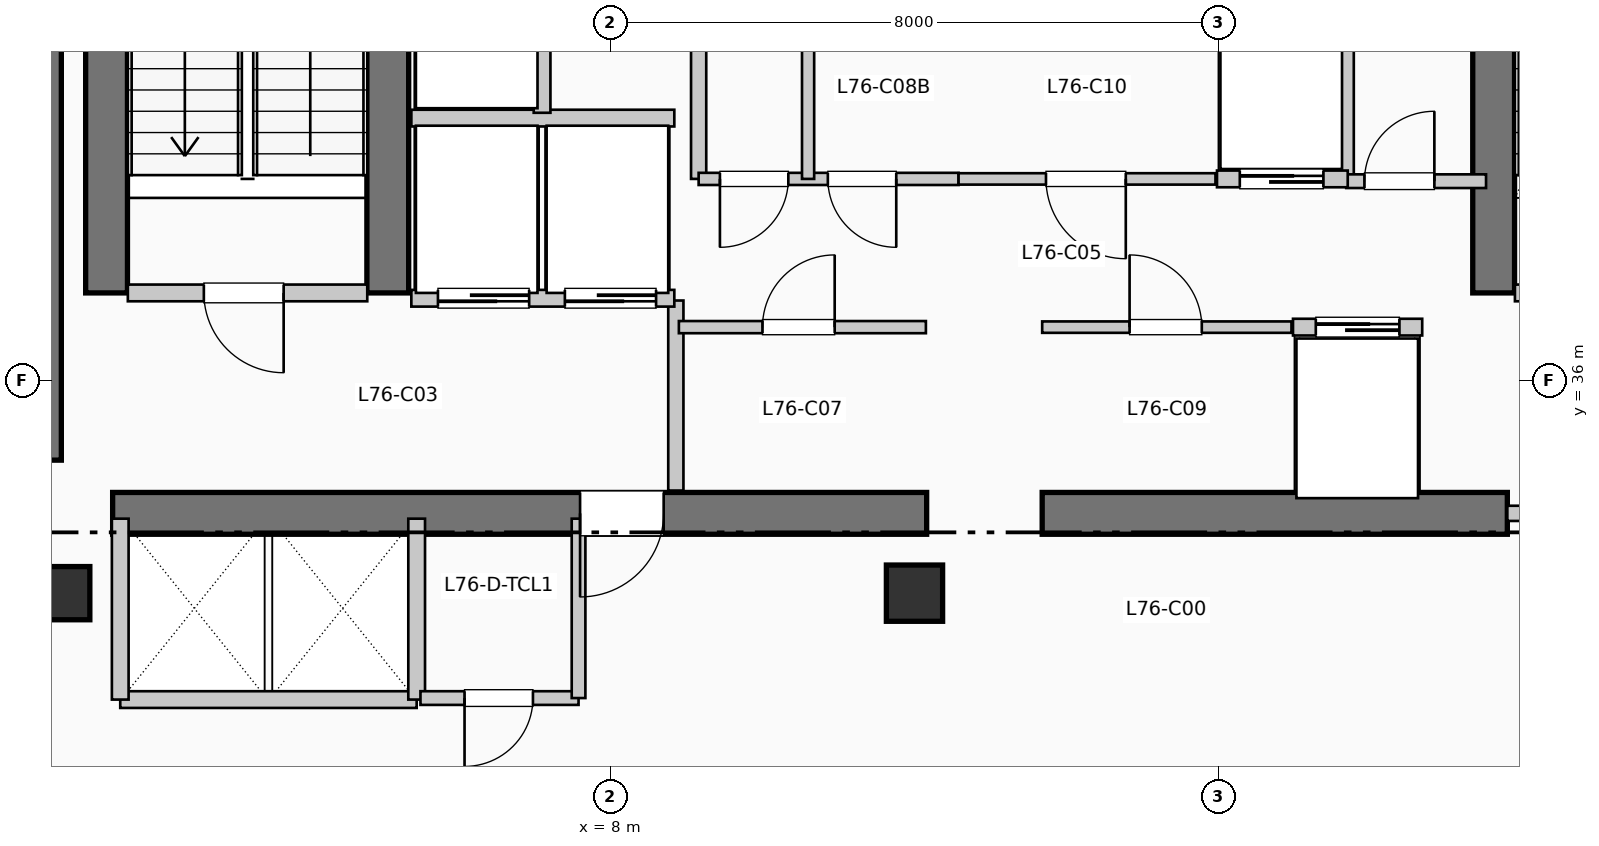
"""IFC4 building model, lengths in metres.
Left out: names, types, materials, properties, quantities, classifications, styles, units other than length and angle.
Written with IfcOpenShell. Run it as: python <this file> out.ifc"""

import sys

from ifc_helpers import new_model, si_unit, direction, frame, frame_2d, origin, origin_2d, place, context, subcontext, project, spatial, rectangle, extrude, element, fill, save


model = new_model("IFC4")
c1 = context("Model", 3, precision=1e-05, world=origin(), true_north=direction((0.0, 1.0)))
c2 = subcontext(c1, "Body", "Model", "MODEL_VIEW")
j1 = project(units=[si_unit("LENGTHUNIT", "METRE"), si_unit("PLANEANGLEUNIT", "RADIAN")], contexts=[c1])
p1 = place(None, origin())
s1 = spatial("IfcSite", under=j1, at=p1, CompositionType="ELEMENT")
p2 = place(p1, origin())
s2 = spatial("IfcBuilding", under=s1, at=p2, CompositionType="ELEMENT")
p3 = place(p2, frame((0.0, 0.0, 311.85)))
s3 = spatial("IfcBuildingStorey", under=s2, at=p3, CompositionType="ELEMENT", Elevation=311.85)
p4 = place(p3, frame((0.5, 34.95, 0.0), z_axis=(0.0, 0.0, 1.0), x_axis=(0.0, 1.0, 0.0)))
e1 = element("IfcWall", 1, at=p4, inside=s3, PredefinedType="SHEAR", context=c2, shape_type="SweptSolid", body=[
    extrude(rectangle(XDim=7.9, YDim=0.55, at=frame_2d((3.95, 0.0))), origin(), (0.0, 0.0, 1.0), 3.96),
])
p5 = place(p3, frame((1.45, 34.25, 0.0), z_axis=(0.0, 0.0, 1.0), x_axis=(1.0, 0.0, 0.0)))
e2 = element("IfcWall", 2, at=p5, inside=s3, PredefinedType="SHEAR", context=c2, shape_type="SweptSolid", body=[
    extrude(rectangle(XDim=10.71, YDim=0.55, at=frame_2d((5.355, 0.0))), origin(), (0.0, 0.0, 1.0), 3.96),
])
p6 = place(p5, frame((7.25, 0.0, 0.0), z_axis=(0.0, 0.0, 1.0), x_axis=(-1.0, 0.0, 0.0)))
e3 = element("IfcOpeningElement", 3, at=p6, cuts=e2, PredefinedType="OPENING", context=c2, shape_type="SweptSolid", body=[
    extrude(rectangle(XDim=1.1, YDim=2.15, at=frame_2d((0.55, 1.075))), frame((0.0, 0.285, 0.0), z_axis=(0.0, -1.0, 0.0), x_axis=(1.0, 0.0, 0.0)), (0.0, 0.0, 1.0), 0.57),
])
p7 = place(p3, frame((13.68, 34.25, 0.0), z_axis=(0.0, 0.0, 1.0), x_axis=(1.0, 0.0, 0.0)))
e4 = element("IfcWall", 4, at=p7, inside=s3, PredefinedType="SHEAR", context=c2, shape_type="SweptSolid", body=[
    extrude(rectangle(XDim=6.12, YDim=0.55, at=frame_2d((3.06, 0.0))), origin(), (0.0, 0.0, 1.0), 3.96),
])
for number, where, z_axis, x_axis in (
    (5, (1.37, 37.15, 0.0), (0.0, 0.0, 1.0), (0.0, 1.0, 0.0)),
    (6, (5.07, 37.15, 0.0), (0.0, 0.0, 1.0), (0.0, 1.0, 0.0)),
    (7, (19.62, 37.15, 0.0), (0.0, 0.0, 1.0), (0.0, 1.0, 0.0)),
):
    element("IfcWall", number, at=place(p3, frame(where, z_axis=z_axis, x_axis=x_axis)), inside=s3, PredefinedType="SHEAR", context=c2, shape_type="SweptSolid", body=[
        extrude(rectangle(XDim=7.89, YDim=0.55, at=frame_2d((3.945, 0.0))), origin(), (0.0, 0.0, 1.0), 3.96),
    ])
p8 = place(p3, frame((0.8, 33.2, 0.0), z_axis=(0.0, 0.0, 1.0), x_axis=(1.0, 0.0, 0.0)))
e8 = element("IfcColumn", 8, at=p8, inside=s3, PredefinedType="COLUMN", context=c2, shape_type="SweptSolid", body=[
    extrude(rectangle(XDim=0.7, YDim=0.7, at=origin_2d()), origin(), (0.0, 0.0, 1.0), 3.96),
])
p9 = place(p3, frame((12.0, 33.2, 0.0), z_axis=(0.0, 0.0, 1.0), x_axis=(1.0, 0.0, 0.0)))
e9 = element("IfcColumn", 9, at=p9, inside=s3, PredefinedType="COLUMN", context=c2, shape_type="SweptSolid", body=[
    extrude(rectangle(XDim=0.74, YDim=0.74, at=origin_2d()), origin(), (0.0, 0.0, 1.0), 3.96),
])
p10 = place(p3, frame((1.65, 37.15, 0.0), z_axis=(0.0, 0.0, 1.0), x_axis=(1.0, 0.0, 0.0)))
e10 = element("IfcWall", 10, at=p10, inside=s3, PredefinedType="PARTITIONING", context=c2, shape_type="SweptSolid", body=[
    extrude(rectangle(XDim=3.15, YDim=0.22, at=frame_2d((1.575, 0.0))), origin(), (0.0, 0.0, 1.0), 3.74),
])
p11 = place(p10, frame((2.05, 0.0, 0.0), z_axis=(0.0, 0.0, 1.0), x_axis=(-1.0, 0.0, 0.0)))
e11 = element("IfcOpeningElement", 11, at=p11, cuts=e10, PredefinedType="OPENING", context=c2, shape_type="SweptSolid", body=[
    extrude(rectangle(XDim=1.05, YDim=2.15, at=frame_2d((0.525, 1.075))), frame((0.0, 0.12, 0.0), z_axis=(0.0, -1.0, 0.0), x_axis=(1.0, 0.0, 0.0)), (0.0, 0.0, 1.0), 0.24),
])
p12 = place(p3, frame((8.86, 34.55, 0.0), z_axis=(0.0, 0.0, 1.0), x_axis=(0.0, 1.0, 0.0)))
e12 = element("IfcWall", 12, at=p12, inside=s3, PredefinedType="PARTITIONING", context=c2, shape_type="SweptSolid", body=[
    extrude(rectangle(XDim=2.5, YDim=0.2, at=frame_2d((1.25, 0.0))), origin(), (0.0, 0.0, 1.0), 3.74),
])
p13 = place(p3, frame((19.9, 37.15, 0.0), z_axis=(0.0, 0.0, 1.0), x_axis=(1.0, 0.0, 0.0)))
e13 = element("IfcWall", 13, at=p13, inside=s3, PredefinedType="PARTITIONING", context=c2, shape_type="SweptSolid", body=[
    extrude(rectangle(XDim=3.15, YDim=0.22, at=frame_2d((1.575, 0.0))), origin(), (0.0, 0.0, 1.0), 3.74),
])
p14 = place(p13, frame((2.05, 0.0, 0.0), z_axis=(0.0, 0.0, 1.0), x_axis=(-1.0, 0.0, 0.0)))
e14 = element("IfcOpeningElement", 14, at=p14, cuts=e13, PredefinedType="OPENING", context=c2, shape_type="SweptSolid", body=[
    extrude(rectangle(XDim=1.05, YDim=2.15, at=frame_2d((0.525, 1.075))), frame((0.0, 0.12, 0.0), z_axis=(0.0, -1.0, 0.0), x_axis=(1.0, 0.0, 0.0)), (0.0, 0.0, 1.0), 0.24),
])
p15 = place(p3, frame((19.8, 34.25, 0.0), z_axis=(0.0, 0.0, 1.0), x_axis=(1.0, 0.0, 0.0)))
e15 = element("IfcWall", 15, at=p15, inside=s3, PredefinedType="PARTITIONING", context=c2, shape_type="SweptSolid", body=[
    extrude(rectangle(XDim=3.25, YDim=0.2, at=frame_2d((1.625, 0.0))), origin(), (0.0, 0.0, 1.0), 3.74),
])
p16 = place(p15, frame((2.15, 0.0, 0.0), z_axis=(0.0, 0.0, 1.0), x_axis=(-1.0, 0.0, 0.0)))
e16 = element("IfcOpeningElement", 16, at=p16, cuts=e15, PredefinedType="OPENING", context=c2, shape_type="SweptSolid", body=[
    extrude(rectangle(XDim=1.1, YDim=2.15, at=frame_2d((0.55, 1.075))), frame((0.0, 0.11, 0.0), z_axis=(0.0, -1.0, 0.0), x_axis=(1.0, 0.0, 0.0)), (0.0, 0.0, 1.0), 0.22),
])
p17 = place(p3, frame((5.38, 37.08, 0.0), z_axis=(0.0, 0.0, 1.0), x_axis=(1.0, 0.0, 0.0)))
e17 = element("IfcWall", 17, at=p17, inside=s3, PredefinedType="PARTITIONING", context=c2, shape_type="SweptSolid", body=[
    extrude(rectangle(XDim=3.46, YDim=0.22, at=frame_2d((1.73, 0.0))), origin(), (0.0, 0.0, 1.0), 3.74),
])
p18 = place(p17, frame((1.55, 0.0, 0.0), z_axis=(0.0, 0.0, 1.0), x_axis=(-1.0, 0.0, 0.0)))
e18 = element("IfcOpeningElement", 18, at=p18, cuts=e17, PredefinedType="OPENING", context=c2, shape_type="SweptSolid", body=[
    extrude(rectangle(XDim=1.2, YDim=2.2, at=frame_2d((0.6, 1.1))), frame((0.0, 0.12, 0.0), z_axis=(0.0, -1.0, 0.0), x_axis=(1.0, 0.0, 0.0)), (0.0, 0.0, 1.0), 0.24),
])
p19 = place(p17, frame((3.22, 0.0, 0.0), z_axis=(0.0, 0.0, 1.0), x_axis=(-1.0, 0.0, 0.0)))
e19 = element("IfcOpeningElement", 19, at=p19, cuts=e17, PredefinedType="OPENING", context=c2, shape_type="SweptSolid", body=[
    extrude(rectangle(XDim=1.2, YDim=2.2, at=frame_2d((0.6, 1.1))), frame((0.0, 0.12, 0.0), z_axis=(0.0, -1.0, 0.0), x_axis=(1.0, 0.0, 0.0)), (0.0, 0.0, 1.0), 0.24),
])
p20 = place(p3, frame((5.38, 39.45, 0.0), z_axis=(0.0, 0.0, 1.0), x_axis=(1.0, 0.0, 0.0)))
e20 = element("IfcWall", 20, at=p20, inside=s3, PredefinedType="PARTITIONING", context=c2, shape_type="SweptSolid", body=[
    extrude(rectangle(XDim=3.46, YDim=0.22, at=frame_2d((1.73, 0.0))), origin(), (0.0, 0.0, 1.0), 3.74),
])
p21 = place(p3, frame((7.1, 39.52, 0.0), z_axis=(0.0, 0.0, 1.0), x_axis=(0.0, 1.0, 0.0)))
e21 = element("IfcWall", 21, at=p21, inside=s3, PredefinedType="PARTITIONING", context=c2, shape_type="SweptSolid", body=[
    extrude(rectangle(XDim=2.93, YDim=0.22, at=frame_2d((1.465, 0.0))), origin(), (0.0, 0.0, 1.0), 3.74),
])
p22 = place(p21, frame((0.85, 0.0, 0.0)))
e22 = element("IfcOpeningElement", 22, at=p22, cuts=e21, PredefinedType="OPENING", context=c2, shape_type="SweptSolid", body=[
    extrude(rectangle(XDim=1.1, YDim=2.2, at=frame_2d((0.55, 1.1))), frame((0.0, 0.12, 0.0), z_axis=(0.0, -1.0, 0.0), x_axis=(1.0, 0.0, 0.0)), (0.0, 0.0, 1.0), 0.24),
])
p23 = place(p3, frame((1.55, 31.8, 0.0), z_axis=(0.0, 0.0, 1.0), x_axis=(1.0, 0.0, 0.0)))
e23 = element("IfcWall", 23, at=p23, inside=s3, PredefinedType="PARTITIONING", context=c2, shape_type="SweptSolid", body=[
    extrude(rectangle(XDim=3.9, YDim=0.22, at=frame_2d((1.95, 0.0))), origin(), (0.0, 0.0, 1.0), 3.74),
])
for number, where, z_axis, x_axis in (
    (24, (1.55, 31.8, 0.0), (0.0, 0.0, 1.0), (0.0, 1.0, 0.0)),
    (25, (5.45, 31.8, 0.0), (0.0, 0.0, 1.0), (0.0, 1.0, 0.0)),
):
    element("IfcWall", number, at=place(p3, frame(where, z_axis=z_axis, x_axis=x_axis)), inside=s3, PredefinedType="PARTITIONING", context=c2, shape_type="SweptSolid", body=[
        extrude(rectangle(XDim=2.38, YDim=0.22, at=frame_2d((1.19, 0.0))), origin(), (0.0, 0.0, 1.0), 3.74),
    ])
for number, where, z_axis, x_axis in (
    (26, (9.16, 38.65, 0.0), (0.0, 0.0, 1.0), (0.0, 1.0, 0.0)),
    (27, (17.68, 38.65, 0.0), (0.0, 0.0, 1.0), (0.0, 1.0, 0.0)),
):
    element("IfcWall", number, at=place(p3, frame(where, z_axis=z_axis, x_axis=x_axis)), inside=s3, PredefinedType="PARTITIONING", context=c2, shape_type="SweptSolid", body=[
        extrude(rectangle(XDim=2.35, YDim=0.2, at=frame_2d((1.175, 0.0))), origin(), (0.0, 0.0, 1.0), 3.74),
    ])
p24 = place(p3, frame((17.68, 38.62, 0.0), z_axis=(0.0, 0.0, 1.0), x_axis=(1.0, 0.0, 0.0)))
e28 = element("IfcWall", 28, at=p24, inside=s3, PredefinedType="PARTITIONING", context=c2, shape_type="SweptSolid", body=[
    extrude(rectangle(XDim=1.84, YDim=0.18, at=frame_2d((0.92, 0.0))), origin(), (0.0, 0.0, 1.0), 3.74),
])
p25 = place(p24, frame((0.24, 0.0, 0.0)))
e29 = element("IfcOpeningElement", 29, at=p25, cuts=e28, PredefinedType="OPENING", context=c2, shape_type="SweptSolid", body=[
    extrude(rectangle(XDim=0.92, YDim=2.1, at=frame_2d((0.46, 1.05))), frame((0.0, 0.1, 0.0), z_axis=(0.0, -1.0, 0.0), x_axis=(1.0, 0.0, 0.0)), (0.0, 0.0, 1.0), 0.2),
])
p26 = place(p3, frame((5.5, 31.82, 0.0), z_axis=(0.0, 0.0, 1.0), x_axis=(1.0, 0.0, 0.0)))
e30 = element("IfcWall", 30, at=p26, inside=s3, PredefinedType="PLUMBINGWALL", context=c2, shape_type="SweptSolid", body=[
    extrude(rectangle(XDim=2.08, YDim=0.18, at=frame_2d((1.04, 0.0))), origin(), (0.0, 0.0, 1.0), 3.74),
])
p27 = place(p26, frame((1.48, 0.0, 0.0), z_axis=(0.0, 0.0, 1.0), x_axis=(-1.0, 0.0, 0.0)))
e31 = element("IfcOpeningElement", 31, at=p27, cuts=e30, PredefinedType="OPENING", context=c2, shape_type="SweptSolid", body=[
    extrude(rectangle(XDim=0.9, YDim=2.1, at=frame_2d((0.45, 1.05))), frame((0.0, 0.1, 0.0), z_axis=(0.0, -1.0, 0.0), x_axis=(1.0, 0.0, 0.0)), (0.0, 0.0, 1.0), 0.2),
])
p28 = place(p3, frame((7.58, 31.82, 0.0), z_axis=(0.0, 0.0, 1.0), x_axis=(0.0, 1.0, 0.0)))
e32 = element("IfcWall", 32, at=p28, inside=s3, PredefinedType="PLUMBINGWALL", context=c2, shape_type="SweptSolid", body=[
    extrude(rectangle(XDim=2.36, YDim=0.18, at=frame_2d((1.18, 0.0))), origin(), (0.0, 0.0, 1.0), 3.74),
])
p29 = place(p3, frame((8.9, 36.7, 0.0), z_axis=(0.0, 0.0, 1.0), x_axis=(1.0, 0.0, 0.0)))
e33 = element("IfcWall", 33, at=p29, inside=s3, PredefinedType="PARTITIONING", context=c2, shape_type="SweptSolid", body=[
    extrude(rectangle(XDim=3.25, YDim=0.16, at=frame_2d((1.625, 0.0))), origin(), (0.0, 0.0, 1.0), 3.74),
])
p30 = place(p29, frame((1.1, 0.0, 0.0)))
e34 = element("IfcOpeningElement", 34, at=p30, cuts=e33, PredefinedType="OPENING", context=c2, shape_type="SweptSolid", body=[
    extrude(rectangle(XDim=0.95, YDim=2.15, at=frame_2d((0.475, 1.075))), frame((0.0, 0.09, 0.0), z_axis=(0.0, -1.0, 0.0), x_axis=(1.0, 0.0, 0.0)), (0.0, 0.0, 1.0), 0.18),
])
p31 = place(p3, frame((9.16, 38.65, 0.0), z_axis=(0.0, 0.0, 1.0), x_axis=(1.0, 0.0, 0.0)))
e35 = element("IfcWall", 35, at=p31, inside=s3, PredefinedType="PARTITIONING", context=c2, shape_type="SweptSolid", body=[
    extrude(rectangle(XDim=3.42, YDim=0.16, at=frame_2d((1.71, 0.0))), origin(), (0.0, 0.0, 1.0), 3.74),
])
p32 = place(p31, frame((1.18, 0.0, 0.0), z_axis=(0.0, 0.0, 1.0), x_axis=(-1.0, 0.0, 0.0)))
e36 = element("IfcOpeningElement", 36, at=p32, cuts=e35, PredefinedType="OPENING", context=c2, shape_type="SweptSolid", body=[
    extrude(rectangle(XDim=0.9, YDim=2.15, at=frame_2d((0.45, 1.075))), frame((0.0, 0.09, 0.0), z_axis=(0.0, -1.0, 0.0), x_axis=(1.0, 0.0, 0.0)), (0.0, 0.0, 1.0), 0.18),
])
p33 = place(p31, frame((2.6, 0.0, 0.0), z_axis=(0.0, 0.0, 1.0), x_axis=(-1.0, 0.0, 0.0)))
e37 = element("IfcOpeningElement", 37, at=p33, cuts=e35, PredefinedType="OPENING", context=c2, shape_type="SweptSolid", body=[
    extrude(rectangle(XDim=0.9, YDim=2.15, at=frame_2d((0.45, 1.075))), frame((0.0, 0.09, 0.0), z_axis=(0.0, -1.0, 0.0), x_axis=(1.0, 0.0, 0.0)), (0.0, 0.0, 1.0), 0.18),
])
p34 = place(p3, frame((10.6, 38.65, 0.0), z_axis=(0.0, 0.0, 1.0), x_axis=(0.0, 1.0, 0.0)))
e38 = element("IfcWall", 38, at=p34, inside=s3, PredefinedType="PARTITIONING", context=c2, shape_type="SweptSolid", body=[
    extrude(rectangle(XDim=2.35, YDim=0.16, at=frame_2d((1.175, 0.0))), origin(), (0.0, 0.0, 1.0), 3.74),
])
p35 = place(p3, frame((13.68, 36.7, 0.0), z_axis=(0.0, 0.0, 1.0), x_axis=(1.0, 0.0, 0.0)))
e39 = element("IfcWall", 39, at=p35, inside=s3, PredefinedType="PARTITIONING", context=c2, shape_type="SweptSolid", body=[
    extrude(rectangle(XDim=3.28, YDim=0.15, at=frame_2d((1.64, 0.0))), origin(), (0.0, 0.0, 1.0), 3.74),
])
p36 = place(p35, frame((1.15, 0.0, 0.0)))
e40 = element("IfcOpeningElement", 40, at=p36, cuts=e39, PredefinedType="OPENING", context=c2, shape_type="SweptSolid", body=[
    extrude(rectangle(XDim=0.95, YDim=2.15, at=frame_2d((0.475, 1.075))), frame((0.0, 0.085, 0.0), z_axis=(0.0, -1.0, 0.0), x_axis=(1.0, 0.0, 0.0)), (0.0, 0.0, 1.0), 0.17),
])
p37 = place(p3, frame((12.58, 38.65, 0.0), z_axis=(0.0, 0.0, 1.0), x_axis=(1.0, 0.0, 0.0)))
e41 = element("IfcWall", 41, at=p37, inside=s3, PredefinedType="PARTITIONING", context=c2, shape_type="SweptSolid", body=[
    extrude(rectangle(XDim=3.38, YDim=0.15, at=frame_2d((1.69, 0.0))), origin(), (0.0, 0.0, 1.0), 3.74),
])
p38 = place(p37, frame((2.2, 0.0, 0.0), z_axis=(0.0, 0.0, 1.0), x_axis=(-1.0, 0.0, 0.0)))
e42 = element("IfcOpeningElement", 42, at=p38, cuts=e41, PredefinedType="OPENING", context=c2, shape_type="SweptSolid", body=[
    extrude(rectangle(XDim=1.05, YDim=2.15, at=frame_2d((0.525, 1.075))), frame((0.0, 0.085, 0.0), z_axis=(0.0, -1.0, 0.0), x_axis=(1.0, 0.0, 0.0)), (0.0, 0.0, 1.0), 0.17),
])
p39 = place(p3, frame((16.98, 36.7, 0.0), z_axis=(0.0, 0.0, 1.0), x_axis=(1.0, 0.0, 0.0)))
e43 = element("IfcWall", 43, at=p39, inside=s3, PredefinedType="PARTITIONING", context=c2, shape_type="SweptSolid", body=[
    extrude(rectangle(XDim=1.7, YDim=0.22, at=frame_2d((0.85, 0.0))), origin(), (0.0, 0.0, 1.0), 3.74),
])
p40 = place(p39, frame((0.3, 0.0, 0.0)))
e44 = element("IfcOpeningElement", 44, at=p40, cuts=e43, PredefinedType="OPENING", context=c2, shape_type="SweptSolid", body=[
    extrude(rectangle(XDim=1.1, YDim=2.2, at=frame_2d((0.55, 1.1))), frame((0.0, 0.12, 0.0), z_axis=(0.0, -1.0, 0.0), x_axis=(1.0, 0.0, 0.0)), (0.0, 0.0, 1.0), 0.24),
])
p41 = place(p3, frame((15.98, 38.65, 0.0), z_axis=(0.0, 0.0, 1.0), x_axis=(1.0, 0.0, 0.0)))
e45 = element("IfcWall", 45, at=p41, inside=s3, PredefinedType="PARTITIONING", context=c2, shape_type="SweptSolid", body=[
    extrude(rectangle(XDim=1.72, YDim=0.22, at=frame_2d((0.86, 0.0))), origin(), (0.0, 0.0, 1.0), 3.74),
])
p42 = place(p41, frame((0.3, 0.0, 0.0)))
e46 = element("IfcOpeningElement", 46, at=p42, cuts=e45, PredefinedType="OPENING", context=c2, shape_type="SweptSolid", body=[
    extrude(rectangle(XDim=1.1, YDim=2.2, at=frame_2d((0.55, 1.1))), frame((0.0, 0.12, 0.0), z_axis=(0.0, -1.0, 0.0), x_axis=(1.0, 0.0, 0.0)), (0.0, 0.0, 1.0), 0.24),
])
p43 = place(p11, origin())
e47 = element("IfcDoor", 47, at=p43, inside=s3, OperationType="SINGLE_SWING_RIGHT", PredefinedType="DOOR", context=c2, shape_type="SweptSolid", body=[
    extrude(rectangle(XDim=1.05, YDim=2.15, at=frame_2d((0.525, 1.075))), frame((0.0, 0.025, 0.0), z_axis=(0.0, -1.0, 0.0), x_axis=(1.0, 0.0, 0.0)), (0.0, 0.0, 1.0), 0.05),
])
fill(e11, e47)
p44 = place(p6, origin())
e48 = element("IfcDoor", 48, at=p44, inside=s3, OperationType="SINGLE_SWING_LEFT", PredefinedType="DOOR", context=c2, shape_type="SweptSolid", body=[
    extrude(rectangle(XDim=1.1, YDim=2.15, at=frame_2d((0.55, 1.075))), frame((0.0, 0.025, 0.0), z_axis=(0.0, -1.0, 0.0), x_axis=(1.0, 0.0, 0.0)), (0.0, 0.0, 1.0), 0.05),
])
fill(e3, e48)
p45 = place(p18, origin())
e49 = element("IfcDoor", 49, at=p45, inside=s3, OperationType="SLIDING_TO_RIGHT", PredefinedType="DOOR", context=c2, shape_type="SweptSolid", body=[
    extrude(rectangle(XDim=1.2, YDim=2.2, at=frame_2d((0.6, 1.1))), frame((0.0, 0.025, 0.0), z_axis=(0.0, -1.0, 0.0), x_axis=(1.0, 0.0, 0.0)), (0.0, 0.0, 1.0), 0.05),
])
fill(e18, e49)
p46 = place(p19, origin())
e50 = element("IfcDoor", 50, at=p46, inside=s3, OperationType="SLIDING_TO_RIGHT", PredefinedType="DOOR", context=c2, shape_type="SweptSolid", body=[
    extrude(rectangle(XDim=1.2, YDim=2.2, at=frame_2d((0.6, 1.1))), frame((0.0, 0.025, 0.0), z_axis=(0.0, -1.0, 0.0), x_axis=(1.0, 0.0, 0.0)), (0.0, 0.0, 1.0), 0.05),
])
fill(e19, e50)
p47 = place(p25, origin())
e51 = element("IfcDoor", 51, at=p47, inside=s3, OperationType="SINGLE_SWING_RIGHT", PredefinedType="DOOR", context=c2, shape_type="SweptSolid", body=[
    extrude(rectangle(XDim=0.92, YDim=2.1, at=frame_2d((0.46, 1.05))), frame((0.0, 0.025, 0.0), z_axis=(0.0, -1.0, 0.0), x_axis=(1.0, 0.0, 0.0)), (0.0, 0.0, 1.0), 0.05),
])
fill(e29, e51)
p48 = place(p27, origin())
e52 = element("IfcDoor", 52, at=p48, inside=s3, OperationType="SINGLE_SWING_LEFT", PredefinedType="DOOR", context=c2, shape_type="SweptSolid", body=[
    extrude(rectangle(XDim=0.9, YDim=2.1, at=frame_2d((0.45, 1.05))), frame((0.0, 0.025, 0.0), z_axis=(0.0, -1.0, 0.0), x_axis=(1.0, 0.0, 0.0)), (0.0, 0.0, 1.0), 0.05),
])
fill(e31, e52)
p49 = place(p30, origin())
e53 = element("IfcDoor", 53, at=p49, inside=s3, OperationType="SINGLE_SWING_RIGHT", PredefinedType="DOOR", context=c2, shape_type="SweptSolid", body=[
    extrude(rectangle(XDim=0.95, YDim=2.15, at=frame_2d((0.475, 1.075))), frame((0.0, 0.025, 0.0), z_axis=(0.0, -1.0, 0.0), x_axis=(1.0, 0.0, 0.0)), (0.0, 0.0, 1.0), 0.05),
])
fill(e34, e53)
p50 = place(p32, origin())
e54 = element("IfcDoor", 54, at=p50, inside=s3, OperationType="SINGLE_SWING_LEFT", PredefinedType="DOOR", context=c2, shape_type="SweptSolid", body=[
    extrude(rectangle(XDim=0.9, YDim=2.15, at=frame_2d((0.45, 1.075))), frame((0.0, 0.025, 0.0), z_axis=(0.0, -1.0, 0.0), x_axis=(1.0, 0.0, 0.0)), (0.0, 0.0, 1.0), 0.05),
])
fill(e36, e54)
p51 = place(p33, origin())
e55 = element("IfcDoor", 55, at=p51, inside=s3, OperationType="SINGLE_SWING_RIGHT", PredefinedType="DOOR", context=c2, shape_type="SweptSolid", body=[
    extrude(rectangle(XDim=0.9, YDim=2.15, at=frame_2d((0.45, 1.075))), frame((0.0, 0.025, 0.0), z_axis=(0.0, -1.0, 0.0), x_axis=(1.0, 0.0, 0.0)), (0.0, 0.0, 1.0), 0.05),
])
fill(e37, e55)
p52 = place(p36, origin())
e56 = element("IfcDoor", 56, at=p52, inside=s3, OperationType="SINGLE_SWING_LEFT", PredefinedType="DOOR", context=c2, shape_type="SweptSolid", body=[
    extrude(rectangle(XDim=0.95, YDim=2.15, at=frame_2d((0.475, 1.075))), frame((0.0, 0.025, 0.0), z_axis=(0.0, -1.0, 0.0), x_axis=(1.0, 0.0, 0.0)), (0.0, 0.0, 1.0), 0.05),
])
fill(e40, e56)
p53 = place(p38, origin())
e57 = element("IfcDoor", 57, at=p53, inside=s3, OperationType="SINGLE_SWING_RIGHT", PredefinedType="DOOR", context=c2, shape_type="SweptSolid", body=[
    extrude(rectangle(XDim=1.05, YDim=2.15, at=frame_2d((0.525, 1.075))), frame((0.0, 0.025, 0.0), z_axis=(0.0, -1.0, 0.0), x_axis=(1.0, 0.0, 0.0)), (0.0, 0.0, 1.0), 0.05),
])
fill(e42, e57)
p54 = place(p40, origin())
e58 = element("IfcDoor", 58, at=p54, inside=s3, OperationType="SLIDING_TO_LEFT", PredefinedType="DOOR", context=c2, shape_type="SweptSolid", body=[
    extrude(rectangle(XDim=1.1, YDim=2.2, at=frame_2d((0.55, 1.1))), frame((0.0, 0.025, 0.0), z_axis=(0.0, -1.0, 0.0), x_axis=(1.0, 0.0, 0.0)), (0.0, 0.0, 1.0), 0.05),
])
fill(e44, e58)
p55 = place(p42, origin())
e59 = element("IfcDoor", 59, at=p55, inside=s3, OperationType="SLIDING_TO_LEFT", PredefinedType="DOOR", context=c2, shape_type="SweptSolid", body=[
    extrude(rectangle(XDim=1.1, YDim=2.2, at=frame_2d((0.55, 1.1))), frame((0.0, 0.025, 0.0), z_axis=(0.0, -1.0, 0.0), x_axis=(1.0, 0.0, 0.0)), (0.0, 0.0, 1.0), 0.05),
])
fill(e46, e59)
save(model, sys.argv[1])
